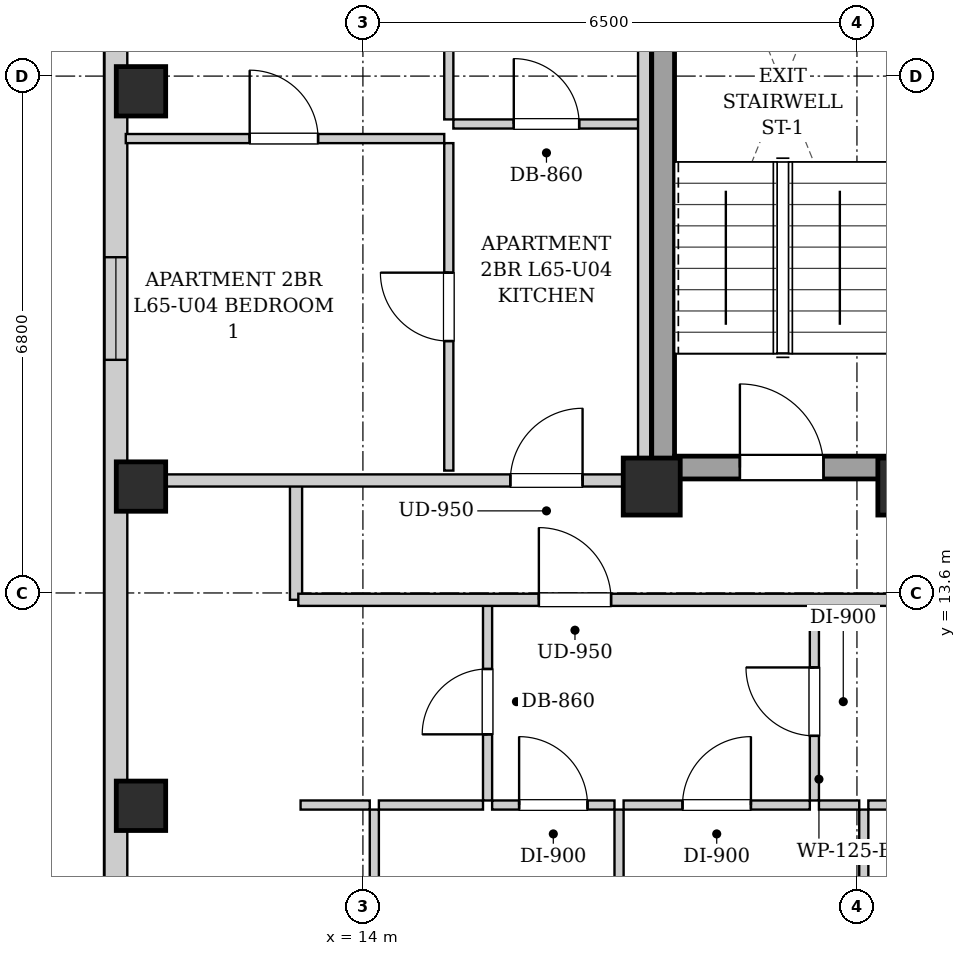
"""IFC4 building model, lengths in metres.
Left out: names, types, materials, properties, quantities, classifications, styles, units other than length and angle.
Written with IfcOpenShell. Run it as: python <this file> out.ifc"""

import sys

from ifc_helpers import new_model, si_unit, direction, frame, frame_2d, origin, origin_2d, place, context, subcontext, project, spatial, rectangle, extrude, element, fill, save


model = new_model("IFC4")
c1 = context("Model", 3, precision=1e-05, world=origin(), true_north=direction((0.0, 1.0)))
c2 = subcontext(c1, "Body", "Model", "MODEL_VIEW")
j1 = project(units=[si_unit("LENGTHUNIT", "METRE"), si_unit("PLANEANGLEUNIT", "RADIAN")], contexts=[c1])
p1 = place(None, origin())
s1 = spatial("IfcSite", under=j1, at=p1, CompositionType="ELEMENT")
p2 = place(p1, origin())
s2 = spatial("IfcBuilding", under=s1, at=p2, CompositionType="ELEMENT")
p3 = place(p2, frame((0.0, 0.0, 224.1)))
s3 = spatial("IfcBuildingStorey", under=s2, at=p3, CompositionType="ELEMENT", Elevation=224.1)
for number, where, z_axis, x_axis in (
    (1, (11.08, 10.8, 0.0), (0.0, 0.0, 1.0), (1.0, 0.0, 0.0)),
    (2, (11.08, 15.0, 0.0), (0.0, 0.0, 1.0), (1.0, 0.0, 0.0)),
    (3, (11.08, 20.2, 0.0), (0.0, 0.0, 1.0), (1.0, 0.0, 0.0)),
):
    element("IfcColumn", number, at=place(p3, frame(where, z_axis=z_axis, x_axis=x_axis)), inside=s3, PredefinedType="COLUMN", context=c2, shape_type="SweptSolid", body=[
        extrude(rectangle(XDim=0.65, YDim=0.65, at=origin_2d()), origin(), (0.0, 0.0, 1.0), 3.4),
    ])
for number, where, z_axis, x_axis in (
    (4, (17.8, 15.0, 0.0), (0.0, 0.0, 1.0), (1.0, 0.0, 0.0)),
    (5, (21.15, 15.0, 0.0), (0.0, 0.0, 1.0), (1.0, 0.0, 0.0)),
):
    element("IfcColumn", number, at=place(p3, frame(where, z_axis=z_axis, x_axis=x_axis)), inside=s3, PredefinedType="COLUMN", context=c2, shape_type="SweptSolid", body=[
        extrude(rectangle(XDim=0.75, YDim=0.75, at=origin_2d()), origin(), (0.0, 0.0, 1.0), 3.4),
    ])
p4 = place(p3, frame((10.75, 6.3, 0.0), z_axis=(0.0, 0.0, 1.0), x_axis=(0.0, 1.0, 0.0)))
e6 = element("IfcWall", 6, at=p4, inside=s3, PredefinedType="SOLIDWALL", context=c2, shape_type="SweptSolid", body=[
    extrude(rectangle(XDim=31.4, YDim=0.3, at=frame_2d((15.7, 0.0))), origin(), (0.0, 0.0, 1.0), 3.14),
])
p5 = place(p4, frame((1.653, 0.0, 0.55)))
e7 = element("IfcOpeningElement", 7, at=p5, cuts=e6, PredefinedType="OPENING", context=c2, shape_type="SweptSolid", body=[
    extrude(rectangle(XDim=1.35, YDim=1.2, at=frame_2d((0.675, 0.6))), frame((0.0, 0.16, 0.0), z_axis=(0.0, -1.0, 0.0), x_axis=(1.0, 0.0, 0.0)), (0.0, 0.0, 1.0), 0.32),
])
p6 = place(p4, frame((10.367, 0.0, 0.55)))
e8 = element("IfcOpeningElement", 8, at=p6, cuts=e6, PredefinedType="OPENING", context=c2, shape_type="SweptSolid", body=[
    extrude(rectangle(XDim=1.35, YDim=1.2, at=frame_2d((0.675, 0.6))), frame((0.0, 0.16, 0.0), z_axis=(0.0, -1.0, 0.0), x_axis=(1.0, 0.0, 0.0)), (0.0, 0.0, 1.0), 0.32),
])
p7 = place(p4, frame((19.683, 0.0, 0.55)))
e9 = element("IfcOpeningElement", 9, at=p7, cuts=e6, PredefinedType="OPENING", context=c2, shape_type="SweptSolid", body=[
    extrude(rectangle(XDim=1.35, YDim=1.2, at=frame_2d((0.675, 0.6))), frame((0.0, 0.16, 0.0), z_axis=(0.0, -1.0, 0.0), x_axis=(1.0, 0.0, 0.0)), (0.0, 0.0, 1.0), 0.32),
])
p8 = place(p3, frame((17.95, 15.1, 0.0), z_axis=(0.0, 0.0, 1.0), x_axis=(0.0, 1.0, 0.0)))
e10 = element("IfcWall", 10, at=p8, inside=s3, PredefinedType="SHEAR", context=c2, shape_type="SweptSolid", body=[
    extrude(rectangle(XDim=9.0, YDim=0.3, at=frame_2d((4.5, 0.0))), origin(), (0.0, 0.0, 1.0), 3.14),
])
p9 = place(p3, frame((18.1, 15.25, 0.0), z_axis=(0.0, 0.0, 1.0), x_axis=(1.0, 0.0, 0.0)))
e11 = element("IfcWall", 11, at=p9, inside=s3, PredefinedType="SHEAR", context=c2, shape_type="SweptSolid", body=[
    extrude(rectangle(XDim=2.85, YDim=0.3, at=frame_2d((1.425, 0.0))), origin(), (0.0, 0.0, 1.0), 3.14),
])
p10 = place(p9, frame((0.86, 0.0, 0.0)))
e12 = element("IfcOpeningElement", 12, at=p10, cuts=e11, PredefinedType="OPENING", context=c2, shape_type="SweptSolid", body=[
    extrude(rectangle(XDim=1.1, YDim=2.05, at=frame_2d((0.55, 1.025))), frame((0.0, 0.16, 0.0), z_axis=(0.0, -1.0, 0.0), x_axis=(1.0, 0.0, 0.0)), (0.0, 0.0, 1.0), 0.32),
])
p11 = place(p3, frame((13.12, 13.51, 0.0), z_axis=(0.0, 0.0, 1.0), x_axis=(0.0, 1.0, 0.0)))
e13 = element("IfcWall", 13, at=p11, inside=s3, PredefinedType="PARTITIONING", context=c2, shape_type="SweptSolid", body=[
    extrude(rectangle(XDim=1.58, YDim=0.16, at=frame_2d((0.79, 0.0))), origin(), (0.0, 0.0, 1.0), 3.14),
])
p12 = place(p3, frame((15.64, 10.87, 0.0), z_axis=(0.0, 0.0, 1.0), x_axis=(0.0, 1.0, 0.0)))
e14 = element("IfcWall", 14, at=p12, inside=s3, PredefinedType="PARTITIONING", context=c2, shape_type="SweptSolid", body=[
    extrude(rectangle(XDim=2.6, YDim=0.12, at=frame_2d((1.3, 0.0))), origin(), (0.0, 0.0, 1.0), 3.14),
])
p13 = place(p12, frame((0.87, 0.0, 0.0)))
e15 = element("IfcOpeningElement", 15, at=p13, cuts=e14, PredefinedType="OPENING", context=c2, shape_type="SweptSolid", body=[
    extrude(rectangle(XDim=0.86, YDim=2.05, at=frame_2d((0.43, 1.025))), frame((0.0, 0.07, 0.0), z_axis=(0.0, -1.0, 0.0), x_axis=(1.0, 0.0, 0.0)), (0.0, 0.0, 1.0), 0.14),
])
p14 = place(p3, frame((13.18, 10.81, 0.0), z_axis=(0.0, 0.0, 1.0), x_axis=(1.0, 0.0, 0.0)))
e16 = element("IfcWall", 16, at=p14, inside=s3, PredefinedType="PARTITIONING", context=c2, shape_type="SweptSolid", body=[
    extrude(rectangle(XDim=0.91, YDim=0.12, at=frame_2d((0.455, 0.0))), origin(), (0.0, 0.0, 1.0), 3.14),
])
p15 = place(p3, frame((14.21, 10.81, 0.0), z_axis=(0.0, 0.0, 1.0), x_axis=(1.0, 0.0, 0.0)))
e17 = element("IfcWall", 17, at=p15, inside=s3, PredefinedType="PARTITIONING", context=c2, shape_type="SweptSolid", body=[
    extrude(rectangle(XDim=1.37, YDim=0.12, at=frame_2d((0.685, 0.0))), origin(), (0.0, 0.0, 1.0), 3.14),
])
p16 = place(p3, frame((19.94, 10.87, 0.0), z_axis=(0.0, 0.0, 1.0), x_axis=(0.0, 1.0, 0.0)))
e18 = element("IfcWall", 18, at=p16, inside=s3, PredefinedType="PARTITIONING", context=c2, shape_type="SweptSolid", body=[
    extrude(rectangle(XDim=2.6, YDim=0.12, at=frame_2d((1.3, 0.0))), origin(), (0.0, 0.0, 1.0), 3.14),
])
p17 = place(p16, frame((0.85, 0.0, 0.0)))
e19 = element("IfcOpeningElement", 19, at=p17, cuts=e18, PredefinedType="OPENING", context=c2, shape_type="SweptSolid", body=[
    extrude(rectangle(XDim=0.9, YDim=2.05, at=frame_2d((0.45, 1.025))), frame((0.0, 0.07, 0.0), z_axis=(0.0, -1.0, 0.0), x_axis=(1.0, 0.0, 0.0)), (0.0, 0.0, 1.0), 0.14),
])
p18 = place(p3, frame((15.7, 10.81, 0.0), z_axis=(0.0, 0.0, 1.0), x_axis=(1.0, 0.0, 0.0)))
e20 = element("IfcWall", 20, at=p18, inside=s3, PredefinedType="PARTITIONING", context=c2, shape_type="SweptSolid", body=[
    extrude(rectangle(XDim=1.61, YDim=0.12, at=frame_2d((0.805, 0.0))), origin(), (0.0, 0.0, 1.0), 3.14),
])
p19 = place(p18, frame((0.355, 0.0, 0.0)))
e21 = element("IfcOpeningElement", 21, at=p19, cuts=e20, PredefinedType="OPENING", context=c2, shape_type="SweptSolid", body=[
    extrude(rectangle(XDim=0.9, YDim=2.05, at=frame_2d((0.45, 1.025))), frame((0.0, 0.07, 0.0), z_axis=(0.0, -1.0, 0.0), x_axis=(1.0, 0.0, 0.0)), (0.0, 0.0, 1.0), 0.14),
])
p20 = place(p3, frame((17.43, 10.81, 0.0), z_axis=(0.0, 0.0, 1.0), x_axis=(1.0, 0.0, 0.0)))
e22 = element("IfcWall", 22, at=p20, inside=s3, PredefinedType="PARTITIONING", context=c2, shape_type="SweptSolid", body=[
    extrude(rectangle(XDim=2.45, YDim=0.12, at=frame_2d((1.225, 0.0))), origin(), (0.0, 0.0, 1.0), 3.14),
])
p21 = place(p20, frame((0.775, 0.0, 0.0)))
e23 = element("IfcOpeningElement", 23, at=p21, cuts=e22, PredefinedType="OPENING", context=c2, shape_type="SweptSolid", body=[
    extrude(rectangle(XDim=0.9, YDim=2.05, at=frame_2d((0.45, 1.025))), frame((0.0, 0.07, 0.0), z_axis=(0.0, -1.0, 0.0), x_axis=(1.0, 0.0, 0.0)), (0.0, 0.0, 1.0), 0.14),
])
p22 = place(p3, frame((20.0, 10.81, 0.0), z_axis=(0.0, 0.0, 1.0), x_axis=(1.0, 0.0, 0.0)))
e24 = element("IfcWall", 24, at=p22, inside=s3, PredefinedType="PARTITIONING", context=c2, shape_type="SweptSolid", body=[
    extrude(rectangle(XDim=0.53, YDim=0.12, at=frame_2d((0.265, 0.0))), origin(), (0.0, 0.0, 1.0), 3.14),
])
p23 = place(p3, frame((20.65, 10.81, 0.0), z_axis=(0.0, 0.0, 1.0), x_axis=(1.0, 0.0, 0.0)))
e25 = element("IfcWall", 25, at=p23, inside=s3, PredefinedType="PARTITIONING", context=c2, shape_type="SweptSolid", body=[
    extrude(rectangle(XDim=1.55, YDim=0.12, at=frame_2d((0.775, 0.0))), origin(), (0.0, 0.0, 1.0), 3.14),
])
p24 = place(p23, frame((0.325, 0.0, 0.0)))
e26 = element("IfcOpeningElement", 26, at=p24, cuts=e25, PredefinedType="OPENING", context=c2, shape_type="SweptSolid", body=[
    extrude(rectangle(XDim=0.9, YDim=2.05, at=frame_2d((0.45, 1.025))), frame((0.0, 0.07, 0.0), z_axis=(0.0, -1.0, 0.0), x_axis=(1.0, 0.0, 0.0)), (0.0, 0.0, 1.0), 0.14),
])
p25 = place(p3, frame((14.15, 4.08, 0.0), z_axis=(0.0, 0.0, 1.0), x_axis=(0.0, 1.0, 0.0)))
e27 = element("IfcWall", 27, at=p25, inside=s3, PredefinedType="PARTITIONING", context=c2, shape_type="SweptSolid", body=[
    extrude(rectangle(XDim=6.67, YDim=0.12, at=frame_2d((3.335, 0.0))), origin(), (0.0, 0.0, 1.0), 3.14),
])
p26 = place(p25, frame((2.87, 0.0, 0.0)))
e28 = element("IfcOpeningElement", 28, at=p26, cuts=e27, PredefinedType="OPENING", context=c2, shape_type="SweptSolid", body=[
    extrude(rectangle(XDim=0.9, YDim=2.05, at=frame_2d((0.45, 1.025))), frame((0.0, 0.07, 0.0), z_axis=(0.0, -1.0, 0.0), x_axis=(1.0, 0.0, 0.0)), (0.0, 0.0, 1.0), 0.14),
])
p27 = place(p3, frame((17.37, 6.23, 0.0), z_axis=(0.0, 0.0, 1.0), x_axis=(0.0, 1.0, 0.0)))
e29 = element("IfcWall", 29, at=p27, inside=s3, PredefinedType="PARTITIONING", context=c2, shape_type="SweptSolid", body=[
    extrude(rectangle(XDim=4.52, YDim=0.12, at=frame_2d((2.26, 0.0))), origin(), (0.0, 0.0, 1.0), 3.14),
])
p28 = place(p27, frame((1.81, 0.0, 0.0)))
e30 = element("IfcOpeningElement", 30, at=p28, cuts=e29, PredefinedType="OPENING", context=c2, shape_type="SweptSolid", body=[
    extrude(rectangle(XDim=0.9, YDim=2.05, at=frame_2d((0.45, 1.025))), frame((0.0, 0.07, 0.0), z_axis=(0.0, -1.0, 0.0), x_axis=(1.0, 0.0, 0.0)), (0.0, 0.0, 1.0), 0.14),
])
p29 = place(p3, frame((20.59, 4.08, 0.0), z_axis=(0.0, 0.0, 1.0), x_axis=(0.0, 1.0, 0.0)))
e31 = element("IfcWall", 31, at=p29, inside=s3, PredefinedType="PARTITIONING", context=c2, shape_type="SweptSolid", body=[
    extrude(rectangle(XDim=6.67, YDim=0.12, at=frame_2d((3.335, 0.0))), origin(), (0.0, 0.0, 1.0), 3.14),
])
p30 = place(p29, frame((2.87, 0.0, 0.0)))
e32 = element("IfcOpeningElement", 32, at=p30, cuts=e31, PredefinedType="OPENING", context=c2, shape_type="SweptSolid", body=[
    extrude(rectangle(XDim=0.9, YDim=2.05, at=frame_2d((0.45, 1.025))), frame((0.0, 0.07, 0.0), z_axis=(0.0, -1.0, 0.0), x_axis=(1.0, 0.0, 0.0)), (0.0, 0.0, 1.0), 0.14),
])
p31 = place(p3, frame((10.88, 15.08, 0.0), z_axis=(0.0, 0.0, 1.0), x_axis=(1.0, 0.0, 0.0)))
e33 = element("IfcWall", 33, at=p31, inside=s3, PredefinedType="PARTITIONING", context=c2, shape_type="SweptSolid", body=[
    extrude(rectangle(XDim=6.88, YDim=0.16, at=frame_2d((3.44, 0.0))), origin(), (0.0, 0.0, 1.0), 2.668),
])
p32 = place(p31, frame((5.06, 0.0, 0.0)))
e34 = element("IfcOpeningElement", 34, at=p32, cuts=e33, PredefinedType="OPENING", context=c2, shape_type="SweptSolid", body=[
    extrude(rectangle(XDim=0.95, YDim=2.1, at=frame_2d((0.475, 1.05))), frame((0.0, 0.09, 0.0), z_axis=(0.0, -1.0, 0.0), x_axis=(1.0, 0.0, 0.0)), (0.0, 0.0, 1.0), 0.18),
])
p33 = place(p3, frame((15.19, 19.77, 0.0), z_axis=(0.0, 0.0, 1.0), x_axis=(1.0, 0.0, 0.0)))
e35 = element("IfcWall", 35, at=p33, inside=s3, PredefinedType="PARTITIONING", context=c2, shape_type="SweptSolid", body=[
    extrude(rectangle(XDim=2.45, YDim=0.12, at=frame_2d((1.225, 0.0))), origin(), (0.0, 0.0, 1.0), 3.14),
])
p34 = place(p33, frame((0.795, 0.0, 0.0)))
e36 = element("IfcOpeningElement", 36, at=p34, cuts=e35, PredefinedType="OPENING", context=c2, shape_type="SweptSolid", body=[
    extrude(rectangle(XDim=0.86, YDim=2.05, at=frame_2d((0.43, 1.025))), frame((0.0, 0.07, 0.0), z_axis=(0.0, -1.0, 0.0), x_axis=(1.0, 0.0, 0.0)), (0.0, 0.0, 1.0), 0.14),
])
p35 = place(p3, frame((15.13, 19.83, 0.0), z_axis=(0.0, 0.0, 1.0), x_axis=(0.0, 1.0, 0.0)))
e37 = element("IfcWall", 37, at=p35, inside=s3, PredefinedType="PARTITIONING", context=c2, shape_type="SweptSolid", body=[
    extrude(rectangle(XDim=2.3, YDim=0.12, at=frame_2d((1.15, 0.0))), origin(), (0.0, 0.0, 1.0), 3.14),
])
p36 = place(p3, frame((15.13, 15.21, 0.0), z_axis=(0.0, 0.0, 1.0), x_axis=(0.0, 1.0, 0.0)))
e38 = element("IfcWall", 38, at=p36, inside=s3, PredefinedType="PARTITIONING", context=c2, shape_type="SweptSolid", body=[
    extrude(rectangle(XDim=4.308, YDim=0.12, at=frame_2d((2.154, 0.0))), origin(), (0.0, 0.0, 1.0), 3.14),
])
p37 = place(p36, frame((1.704, 0.0, 0.0)))
e39 = element("IfcOpeningElement", 39, at=p37, cuts=e38, PredefinedType="OPENING", context=c2, shape_type="SweptSolid", body=[
    extrude(rectangle(XDim=0.9, YDim=2.05, at=frame_2d((0.45, 1.025))), frame((0.0, 0.07, 0.0), z_axis=(0.0, -1.0, 0.0), x_axis=(1.0, 0.0, 0.0)), (0.0, 0.0, 1.0), 0.14),
])
p38 = place(p3, frame((10.88, 19.578, 0.0), z_axis=(0.0, 0.0, 1.0), x_axis=(1.0, 0.0, 0.0)))
e40 = element("IfcWall", 40, at=p38, inside=s3, PredefinedType="PARTITIONING", context=c2, shape_type="SweptSolid", body=[
    extrude(rectangle(XDim=4.19, YDim=0.12, at=frame_2d((2.095, 0.0))), origin(), (0.0, 0.0, 1.0), 3.14),
])
p39 = place(p38, frame((1.63, 0.0, 0.0)))
e41 = element("IfcOpeningElement", 41, at=p39, cuts=e40, PredefinedType="OPENING", context=c2, shape_type="SweptSolid", body=[
    extrude(rectangle(XDim=0.9, YDim=2.05, at=frame_2d((0.45, 1.025))), frame((0.0, 0.07, 0.0), z_axis=(0.0, -1.0, 0.0), x_axis=(1.0, 0.0, 0.0)), (0.0, 0.0, 1.0), 0.14),
])
p40 = place(p3, frame((13.15, 13.51, 0.0), z_axis=(0.0, 0.0, 1.0), x_axis=(1.0, 0.0, 0.0)))
e42 = element("IfcWall", 42, at=p40, inside=s3, PredefinedType="PARTITIONING", context=c2, shape_type="SweptSolid", body=[
    extrude(rectangle(XDim=24.6, YDim=0.16, at=frame_2d((12.3, 0.0))), origin(), (0.0, 0.0, 1.0), 3.14),
])
p41 = place(p40, frame((3.165, 0.0, 0.0)))
e43 = element("IfcOpeningElement", 43, at=p41, cuts=e42, PredefinedType="OPENING", context=c2, shape_type="SweptSolid", body=[
    extrude(rectangle(XDim=0.95, YDim=2.1, at=frame_2d((0.475, 1.05))), frame((0.0, 0.09, 0.0), z_axis=(0.0, -1.0, 0.0), x_axis=(1.0, 0.0, 0.0)), (0.0, 0.0, 1.0), 0.18),
])
p42 = place(p3, frame((17.7, 15.02, 0.0), z_axis=(0.0, 0.0, 1.0), x_axis=(0.0, 1.0, 0.0)))
e44 = element("IfcWall", 44, at=p42, inside=s3, PredefinedType="PARTITIONING", context=c2, shape_type="SweptSolid", body=[
    extrude(rectangle(XDim=13.98, YDim=0.16, at=frame_2d((6.99, 0.0))), origin(), (0.0, 0.0, 1.0), 3.14),
])
p43 = place(p10, origin())
e45 = element("IfcDoor", 45, at=p43, inside=s3, OperationType="SINGLE_SWING_LEFT", PredefinedType="DOOR", context=c2, shape_type="SweptSolid", body=[
    extrude(rectangle(XDim=1.1, YDim=2.05, at=frame_2d((0.55, 1.025))), frame((0.0, 0.025, 0.0), z_axis=(0.0, -1.0, 0.0), x_axis=(1.0, 0.0, 0.0)), (0.0, 0.0, 1.0), 0.05),
])
fill(e12, e45)
p44 = place(p13, origin())
e46 = element("IfcDoor", 46, at=p44, inside=s3, OperationType="SINGLE_SWING_LEFT", PredefinedType="DOOR", context=c2, shape_type="SweptSolid", body=[
    extrude(rectangle(XDim=0.86, YDim=2.05, at=frame_2d((0.43, 1.025))), frame((0.0, 0.025, 0.0), z_axis=(0.0, -1.0, 0.0), x_axis=(1.0, 0.0, 0.0)), (0.0, 0.0, 1.0), 0.05),
])
fill(e15, e46)
p45 = place(p17, origin())
e47 = element("IfcDoor", 47, at=p45, inside=s3, OperationType="SINGLE_SWING_RIGHT", PredefinedType="DOOR", context=c2, shape_type="SweptSolid", body=[
    extrude(rectangle(XDim=0.9, YDim=2.05, at=frame_2d((0.45, 1.025))), frame((0.0, 0.025, 0.0), z_axis=(0.0, -1.0, 0.0), x_axis=(1.0, 0.0, 0.0)), (0.0, 0.0, 1.0), 0.05),
])
fill(e19, e47)
p46 = place(p19, origin())
e48 = element("IfcDoor", 48, at=p46, inside=s3, OperationType="SINGLE_SWING_LEFT", PredefinedType="DOOR", context=c2, shape_type="SweptSolid", body=[
    extrude(rectangle(XDim=0.9, YDim=2.05, at=frame_2d((0.45, 1.025))), frame((0.0, 0.025, 0.0), z_axis=(0.0, -1.0, 0.0), x_axis=(1.0, 0.0, 0.0)), (0.0, 0.0, 1.0), 0.05),
])
fill(e21, e48)
p47 = place(p21, origin())
e49 = element("IfcDoor", 49, at=p47, inside=s3, OperationType="SINGLE_SWING_RIGHT", PredefinedType="DOOR", context=c2, shape_type="SweptSolid", body=[
    extrude(rectangle(XDim=0.9, YDim=2.05, at=frame_2d((0.45, 1.025))), frame((0.0, 0.025, 0.0), z_axis=(0.0, -1.0, 0.0), x_axis=(1.0, 0.0, 0.0)), (0.0, 0.0, 1.0), 0.05),
])
fill(e23, e49)
p48 = place(p32, origin())
e50 = element("IfcDoor", 50, at=p48, inside=s3, OperationType="SINGLE_SWING_RIGHT", PredefinedType="DOOR", context=c2, shape_type="SweptSolid", body=[
    extrude(rectangle(XDim=0.95, YDim=2.1, at=frame_2d((0.475, 1.05))), frame((0.0, 0.025, 0.0), z_axis=(0.0, -1.0, 0.0), x_axis=(1.0, 0.0, 0.0)), (0.0, 0.0, 1.0), 0.05),
])
fill(e34, e50)
p49 = place(p34, origin())
e51 = element("IfcDoor", 51, at=p49, inside=s3, OperationType="SINGLE_SWING_LEFT", PredefinedType="DOOR", context=c2, shape_type="SweptSolid", body=[
    extrude(rectangle(XDim=0.86, YDim=2.05, at=frame_2d((0.43, 1.025))), frame((0.0, 0.025, 0.0), z_axis=(0.0, -1.0, 0.0), x_axis=(1.0, 0.0, 0.0)), (0.0, 0.0, 1.0), 0.05),
])
fill(e36, e51)
p50 = place(p37, origin())
e52 = element("IfcDoor", 52, at=p50, inside=s3, OperationType="SINGLE_SWING_RIGHT", PredefinedType="DOOR", context=c2, shape_type="SweptSolid", body=[
    extrude(rectangle(XDim=0.9, YDim=2.05, at=frame_2d((0.45, 1.025))), frame((0.0, 0.025, 0.0), z_axis=(0.0, -1.0, 0.0), x_axis=(1.0, 0.0, 0.0)), (0.0, 0.0, 1.0), 0.05),
])
fill(e39, e52)
p51 = place(p39, origin())
e53 = element("IfcDoor", 53, at=p51, inside=s3, OperationType="SINGLE_SWING_LEFT", PredefinedType="DOOR", context=c2, shape_type="SweptSolid", body=[
    extrude(rectangle(XDim=0.9, YDim=2.05, at=frame_2d((0.45, 1.025))), frame((0.0, 0.025, 0.0), z_axis=(0.0, -1.0, 0.0), x_axis=(1.0, 0.0, 0.0)), (0.0, 0.0, 1.0), 0.05),
])
fill(e41, e53)
p52 = place(p41, origin())
e54 = element("IfcDoor", 54, at=p52, inside=s3, OperationType="SINGLE_SWING_LEFT", PredefinedType="DOOR", context=c2, shape_type="SweptSolid", body=[
    extrude(rectangle(XDim=0.95, YDim=2.1, at=frame_2d((0.475, 1.05))), frame((0.0, 0.025, 0.0), z_axis=(0.0, -1.0, 0.0), x_axis=(1.0, 0.0, 0.0)), (0.0, 0.0, 1.0), 0.05),
])
fill(e43, e54)
p53 = place(p6, origin())
e55 = element("IfcWindow", 55, at=p53, inside=s3, PartitioningType="SINGLE_PANEL", PredefinedType="WINDOW", context=c2, shape_type="SweptSolid", body=[
    extrude(rectangle(XDim=1.35, YDim=1.2, at=frame_2d((0.675, 0.6))), frame((0.0, 0.03, 0.0), z_axis=(0.0, -1.0, 0.0), x_axis=(1.0, 0.0, 0.0)), (0.0, 0.0, 1.0), 0.06),
])
fill(e8, e55)
save(model, sys.argv[1])
